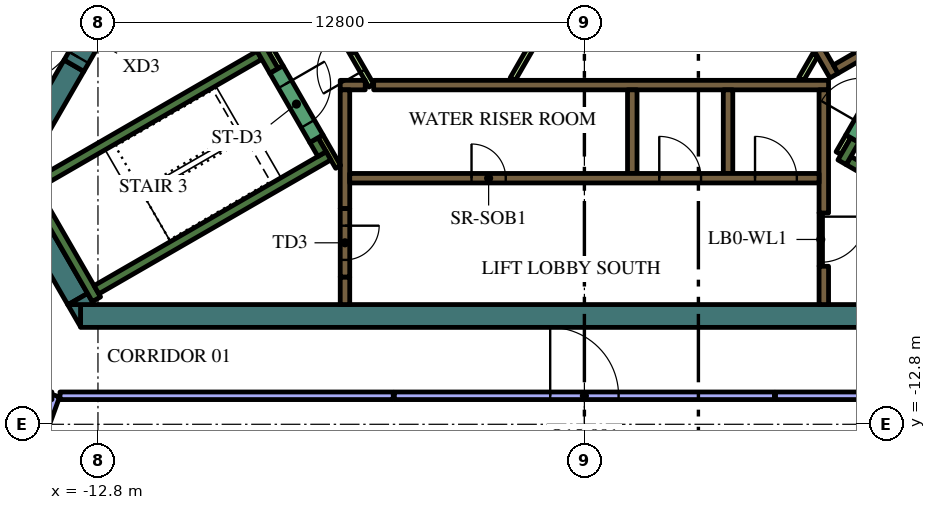
"""IFC4 building model, lengths in metres.
Left out: names, types, materials, properties, quantities, classifications, styles, units other than length and angle.
Written with IfcOpenShell. Run it as: python <this file> out.ifc"""

import sys

from ifc_helpers import new_model, si_unit, direction, frame, frame_2d, origin, place, context, subcontext, project, spatial, polyline, rectangle, outline, extrude, element, fill, save


model = new_model("IFC4")
c1 = context("Model", 3, precision=1e-05, world=origin(), true_north=direction((0.0, 1.0)))
c2 = subcontext(c1, "Body", "Model", "MODEL_VIEW")
j1 = project(units=[si_unit("LENGTHUNIT", "METRE"), si_unit("PLANEANGLEUNIT", "RADIAN")], contexts=[c1])
p1 = place(None, origin())
s1 = spatial("IfcSite", under=j1, at=p1, CompositionType="ELEMENT")
p2 = place(p1, origin())
s2 = spatial("IfcBuilding", under=s1, at=p2, CompositionType="ELEMENT")
p3 = place(p2, frame((0.0, 0.0, 317.4)))
s3 = spatial("IfcBuildingStorey", under=s2, at=p3, CompositionType="ELEMENT", Elevation=317.4)
p4 = place(p3, frame((8.904, -9.95, 0.0), z_axis=(0.0, 0.0, 1.0), x_axis=(-1.0, 0.0, 0.0)))
e1 = element("IfcWall", 1, at=p4, inside=s3, PredefinedType="SOLIDWALL", context=c2, shape_type="SweptSolid", body=[
    extrude(rectangle(XDim=22.161, YDim=0.6, at=frame_2d((11.081, 0.0))), origin(), (0.0, 0.0, 1.0), 4.2),
])
p5 = place(p3, origin())
e2 = element("IfcWall", 2, at=p5, inside=s3, PredefinedType="SOLIDWALL", context=c2, shape_type="SweptSolid", body=[
    extrude(outline(polyline([(-13.597, -9.65), (-13.259, -9.65), (-13.259, -10.236), (-13.597, -9.65)])), origin(), (0.0, 0.0, 1.0), 4.2),
])
p6 = place(p3, frame((-13.333, -9.506, 0.0), z_axis=(0.0, 0.0, 1.0), x_axis=(-0.500019073792, 0.866014391245, 0.0)))
e3 = element("IfcWall", 3, at=p6, inside=s3, PredefinedType="SOLIDWALL", context=c2, shape_type="SweptSolid", body=[
    extrude(rectangle(XDim=3.823, YDim=0.6, at=frame_2d((1.912, 0.0))), origin(), (0.0, 0.0, 1.0), 4.2),
])
e4 = element("IfcWall", 4, at=p5, inside=s3, PredefinedType="SOLIDWALL", context=c2, shape_type="SweptSolid", body=[
    extrude(outline(polyline([(-12.904, -9.65), (-13.58, -9.65), (-13.073, -9.357), (-12.904, -9.65)])), origin(), (0.0, 0.0, 1.0), 4.2),
])
p7 = place(p3, frame((-13.432, -3.364, 0.0), z_axis=(0.0, 0.0, 1.0), x_axis=(-0.499960127962, -0.866048422692, 0.0)))
e5 = element("IfcWall", 5, at=p7, inside=s3, PredefinedType="SOLIDWALL", context=c2, shape_type="SweptSolid", body=[
    extrude(rectangle(XDim=2.934, YDim=0.6, at=frame_2d((1.467, 0.0))), origin(), (0.0, 0.0, 1.0), 4.2),
])
p8 = place(p3, frame((12.84, -9.261, 0.0), z_axis=(0.0, 0.0, 1.0), x_axis=(-0.866013990052, 0.500019768644, 0.0)))
e6 = element("IfcWall", 6, at=p8, inside=s3, PredefinedType="SOLIDWALL", context=c2, shape_type="SweptSolid", body=[
    extrude(rectangle(XDim=6.8, YDim=0.25, at=frame_2d((3.4, 0.0))), origin(), (0.0, 0.0, 1.0), 4.2),
])
p9 = place(p3, frame((6.78, -5.906, 0.0), z_axis=(0.0, 0.0, 1.0), x_axis=(0.500223362819, 0.865896406789, 0.0)))
e7 = element("IfcWall", 7, at=p9, inside=s3, PredefinedType="SOLIDWALL", context=c2, shape_type="SweptSolid", body=[
    extrude(rectangle(XDim=0.675, YDim=0.25, at=frame_2d((0.337, 0.0))), origin(), (0.0, 0.0, 1.0), 4.2),
])
p10 = place(p3, frame((-12.84, -9.511, 0.0), z_axis=(0.0, 0.0, 1.0), x_axis=(-0.499997733992, 0.866026712061, 0.0)))
e8 = element("IfcWall", 8, at=p10, inside=s3, PredefinedType="SOLIDWALL", context=c2, shape_type="SweptSolid", body=[
    extrude(rectangle(XDim=3.634, YDim=0.25, at=frame_2d((1.817, 0.0))), origin(), (0.0, 0.0, 1.0), 4.2),
])
p11 = place(p3, frame((-14.44, -6.49, 0.0), z_axis=(0.0, 0.0, 1.0), x_axis=(0.866022966069, 0.500004222222, 0.0)))
e9 = element("IfcWall", 9, at=p11, inside=s3, PredefinedType="SOLIDWALL", context=c2, shape_type="SweptSolid", body=[
    extrude(rectangle(XDim=6.8, YDim=0.25, at=frame_2d((3.4, 0.0))), origin(), (0.0, 0.0, 1.0), 4.2),
])
p12 = place(p3, frame((-8.168, -3.503, 0.0), z_axis=(0.0, 0.0, 1.0), x_axis=(-0.499952099219, 0.866053057547, 0.0)))
e10 = element("IfcWall", 10, at=p12, inside=s3, PredefinedType="SOLIDWALL", context=c2, shape_type="SweptSolid", body=[
    extrude(rectangle(XDim=0.675, YDim=0.25, at=frame_2d((0.337, 0.0))), origin(), (0.0, 0.0, 1.0), 4.2),
])
p13 = place(p3, frame((-12.84, -9.261, 0.0), z_axis=(0.0, 0.0, 1.0), x_axis=(0.866016039709, 0.500016218704, 0.0)))
e11 = element("IfcWall", 11, at=p13, inside=s3, PredefinedType="SOLIDWALL", context=c2, shape_type="SweptSolid", body=[
    extrude(rectangle(XDim=7.05, YDim=0.25, at=frame_2d((3.525, 0.0))), origin(), (0.0, 0.0, 1.0), 4.2),
])
p14 = place(p3, frame((-6.905, -5.69, 0.0), z_axis=(0.0, 0.0, 1.0), x_axis=(-0.500402024738, 0.865793170242, 0.0)))
e12 = element("IfcWall", 12, at=p14, inside=s3, PredefinedType="SOLIDWALL", context=c2, shape_type="SweptSolid", body=[
    extrude(rectangle(XDim=0.425, YDim=0.25, at=frame_2d((0.212, 0.0))), origin(), (0.0, 0.0, 1.0), 4.2),
])
p15 = place(p3, frame((-5.545, -3.875, 0.0), z_axis=(0.0, 0.0, 1.0), x_axis=(1.0, 0.0, 0.0)))
e13 = element("IfcWall", 13, at=p15, inside=s3, PredefinedType="SOLIDWALL", context=c2, shape_type="SweptSolid", body=[
    extrude(rectangle(XDim=11.97, YDim=0.25, at=frame_2d((5.985, 0.0))), origin(), (0.0, 0.0, 1.0), 4.2),
])
p16 = place(p3, frame((-6.425, -3.875, 0.0), z_axis=(0.0, 0.0, 1.0), x_axis=(1.0, 0.0, 0.0)))
e14 = element("IfcWall", 14, at=p16, inside=s3, PredefinedType="SOLIDWALL", context=c2, shape_type="SweptSolid", body=[
    extrude(rectangle(XDim=0.658, YDim=0.25, at=frame_2d((0.329, 0.0))), origin(), (0.0, 0.0, 1.0), 4.2),
])
p17 = place(p3, frame((6.3, -7.24, 0.0), z_axis=(0.0, 0.0, 1.0), x_axis=(0.0, 1.0, 0.0)))
e15 = element("IfcWall", 15, at=p17, inside=s3, PredefinedType="SOLIDWALL", context=c2, shape_type="SweptSolid", body=[
    extrude(rectangle(XDim=3.24, YDim=0.25, at=frame_2d((1.62, 0.0))), origin(), (0.0, 0.0, 1.0), 4.2),
])
p18 = place(p3, frame((6.3, -9.65, 0.0), z_axis=(0.0, 0.0, 1.0), x_axis=(0.0, 1.0, 0.0)))
e16 = element("IfcWall", 16, at=p18, inside=s3, PredefinedType="SOLIDWALL", context=c2, shape_type="SweptSolid", body=[
    extrude(rectangle(XDim=1.008, YDim=0.25, at=frame_2d((0.504, 0.0))), origin(), (0.0, 0.0, 1.0), 4.2),
])
for number, where, z_axis, x_axis in (
    (17, (3.78, -4.0, 0.0), (0.0, 0.0, 1.0), (0.0, -1.0, 0.0)),
    (18, (1.26, -4.0, 0.0), (0.0, 0.0, 1.0), (0.0, -1.0, 0.0)),
):
    element("IfcWall", number, at=place(p3, frame(where, z_axis=z_axis, x_axis=x_axis)), inside=s3, PredefinedType="SOLIDWALL", context=c2, shape_type="SweptSolid", body=[
        extrude(rectangle(XDim=2.2, YDim=0.25, at=frame_2d((1.1, 0.0))), origin(), (0.0, 0.0, 1.0), 4.2),
    ])
p19 = place(p3, frame((-6.3, -7.125, 0.0), z_axis=(0.0, 0.0, 1.0), x_axis=(0.0, 1.0, 0.0)))
e19 = element("IfcWall", 19, at=p19, inside=s3, PredefinedType="SOLIDWALL", context=c2, shape_type="SweptSolid", body=[
    extrude(rectangle(XDim=3.125, YDim=0.25, at=frame_2d((1.562, 0.0))), origin(), (0.0, 0.0, 1.0), 4.2),
])
p20 = place(p3, frame((-6.3, -8.925, 0.0), z_axis=(0.0, 0.0, 1.0), x_axis=(0.0, -1.0, 0.0)))
e20 = element("IfcWall", 20, at=p20, inside=s3, PredefinedType="SOLIDWALL", context=c2, shape_type="SweptSolid", body=[
    extrude(rectangle(XDim=0.725, YDim=0.25, at=frame_2d((0.363, 0.0))), origin(), (0.0, 0.0, 1.0), 4.2),
])
p21 = place(p3, frame((6.568, -3.627, 0.0), z_axis=(0.0, 0.0, 1.0), x_axis=(-0.499999455981, 0.866025717874, 0.0)))
e21 = element("IfcWall", 21, at=p21, inside=s3, PredefinedType="SOLIDWALL", context=c2, shape_type="SweptSolid", body=[
    extrude(rectangle(XDim=11.978, YDim=0.25, at=frame_2d((5.989, 0.0))), origin(), (0.0, 0.0, 1.0), 4.2),
])
p22 = place(p3, frame((6.614, -3.456, 0.0), z_axis=(0.0, 0.0, 1.0), x_axis=(0.866032512851, 0.499987686533, 0.0)))
e22 = element("IfcWall", 22, at=p22, inside=s3, PredefinedType="SOLIDWALL", context=c2, shape_type="SweptSolid", body=[
    extrude(rectangle(XDim=2.975, YDim=0.25, at=frame_2d((1.487, 0.0))), origin(), (0.0, 0.0, 1.0), 4.2),
])
p23 = place(p3, frame((-8.252, -2.958, 0.0), z_axis=(0.0, 0.0, 1.0), x_axis=(0.500174715838, -0.865924508047, 0.0)))
e23 = element("IfcWall", 23, at=p23, inside=s3, PredefinedType="PARTITIONING", context=c2, shape_type="SweptSolid", body=[
    extrude(rectangle(XDim=0.514, YDim=0.15, at=frame_2d((0.257, 0.0))), origin(), (0.0, 0.0, 1.0), 3.5),
])
p24 = place(p3, frame((-6.48, -6.027, 0.0), z_axis=(0.0, 0.0, 1.0), x_axis=(-0.499927229454, 0.866067413802, 0.0)))
e24 = element("IfcWall", 24, at=p24, inside=s3, PredefinedType="PARTITIONING", context=c2, shape_type="SweptSolid", body=[
    extrude(rectangle(XDim=0.929, YDim=0.15, at=frame_2d((0.464, 0.0))), origin(), (0.0, 0.0, 1.0), 4.2),
])
p25 = place(p3, frame((6.945, -5.222, 0.0), z_axis=(0.0, 0.0, 1.0), x_axis=(-0.499818422106, -0.866130212453, 0.0)))
e25 = element("IfcWall", 25, at=p25, inside=s3, PredefinedType="PARTITIONING", context=c2, shape_type="SweptSolid", body=[
    extrude(rectangle(XDim=0.514, YDim=0.15, at=frame_2d((0.257, 0.0))), origin(), (0.0, 0.0, 1.0), 3.5),
])
p26 = place(p3, frame((5.705, -3.718, 0.0), z_axis=(0.0, 0.0, 1.0), x_axis=(0.499962090823, 0.866047289552, 0.0)))
e26 = element("IfcWall", 26, at=p26, inside=s3, PredefinedType="PARTITIONING", context=c2, shape_type="SweptSolid", body=[
    extrude(rectangle(XDim=0.735, YDim=0.15, at=frame_2d((0.367, 0.0))), origin(), (0.0, 0.0, 1.0), 3.5),
])
p27 = place(p3, frame((-1.887, -3.718, 0.0), z_axis=(0.0, 0.0, 1.0), x_axis=(0.500043732237, 0.866000153493, 0.0)))
e27 = element("IfcWall", 27, at=p27, inside=s3, PredefinedType="PARTITIONING", context=c2, shape_type="SweptSolid", body=[
    extrude(rectangle(XDim=3.114, YDim=0.15, at=frame_2d((1.557, 0.0))), origin(), (0.0, 0.0, 1.0), 3.5),
])
p28 = place(p3, frame((-6.175, -6.325, 0.0), z_axis=(0.0, 0.0, 1.0), x_axis=(1.0, 0.0, 0.0)))
e28 = element("IfcWall", 28, at=p28, inside=s3, PredefinedType="SOLIDWALL", context=c2, shape_type="SweptSolid", body=[
    extrude(rectangle(XDim=12.35, YDim=0.25, at=frame_2d((6.175, 0.0))), origin(), (0.0, 0.0, 1.0), 4.2),
])
p29 = place(p28, frame((3.205, 0.0, 0.0)))
e29 = element("IfcOpeningElement", 29, at=p29, cuts=e28, PredefinedType="OPENING", context=c2, shape_type="SweptSolid", body=[
    extrude(rectangle(XDim=0.9, YDim=2.1, at=frame_2d((0.45, 1.05))), frame((0.0, 0.135, 0.0), z_axis=(0.0, -1.0, 0.0), x_axis=(1.0, 0.0, 0.0)), (0.0, 0.0, 1.0), 0.27),
])
p30 = place(p28, frame((8.145, 0.0, 0.0)))
e30 = element("IfcOpeningElement", 30, at=p30, cuts=e28, PredefinedType="OPENING", context=c2, shape_type="SweptSolid", body=[
    extrude(rectangle(XDim=1.1, YDim=2.1, at=frame_2d((0.55, 1.05))), frame((0.0, 0.135, 0.0), z_axis=(0.0, -1.0, 0.0), x_axis=(1.0, 0.0, 0.0)), (0.0, 0.0, 1.0), 0.27),
])
p31 = place(p28, frame((10.665, 0.0, 0.0)))
e31 = element("IfcOpeningElement", 31, at=p31, cuts=e28, PredefinedType="OPENING", context=c2, shape_type="SweptSolid", body=[
    extrude(rectangle(XDim=1.1, YDim=2.1, at=frame_2d((0.55, 1.05))), frame((0.0, 0.135, 0.0), z_axis=(0.0, -1.0, 0.0), x_axis=(1.0, 0.0, 0.0)), (0.0, 0.0, 1.0), 0.27),
])
p32 = place(p3, frame((7.053, -5.284, 0.0), z_axis=(0.0, 0.0, 1.0), x_axis=(0.500078061341, 0.865980330357, 0.0)))
e32 = element("IfcWall", 32, at=p32, inside=s3, PredefinedType="SOLIDWALL", context=c2, shape_type="SweptSolid", body=[
    extrude(rectangle(XDim=2.1, YDim=0.4, at=frame_2d((1.05, 0.0))), origin(), (0.0, 0.0, 1.0), 4.2),
])
p33 = place(p32, frame((0.45, 0.0, 0.0)))
e33 = element("IfcOpeningElement", 33, at=p33, cuts=e32, PredefinedType="OPENING", context=c2, shape_type="SweptSolid", body=[
    extrude(rectangle(XDim=1.2, YDim=2.1, at=frame_2d((0.6, 1.05))), frame((0.0, 0.21, 0.0), z_axis=(0.0, -1.0, 0.0), x_axis=(1.0, 0.0, 0.0)), (0.0, 0.0, 1.0), 0.42),
])
p34 = place(p3, frame((-8.103, -3.466, 0.0), z_axis=(0.0, 0.0, 1.0), x_axis=(0.500078061341, -0.865980330357, 0.0)))
e34 = element("IfcWall", 34, at=p34, inside=s3, PredefinedType="SOLIDWALL", context=c2, shape_type="SweptSolid", body=[
    extrude(rectangle(XDim=2.1, YDim=0.4, at=frame_2d((1.05, 0.0))), origin(), (0.0, 0.0, 1.0), 4.2),
])
p35 = place(p34, frame((0.45, 0.0, 0.0)))
e35 = element("IfcOpeningElement", 35, at=p35, cuts=e34, PredefinedType="OPENING", context=c2, shape_type="SweptSolid", body=[
    extrude(rectangle(XDim=1.2, YDim=2.1, at=frame_2d((0.6, 1.05))), frame((0.0, 0.21, 0.0), z_axis=(0.0, -1.0, 0.0), x_axis=(1.0, 0.0, 0.0)), (0.0, 0.0, 1.0), 0.42),
])
p36 = place(p3, frame((-6.3, -7.125, 0.0), z_axis=(0.0, 0.0, 1.0), x_axis=(0.0, -1.0, 0.0)))
e36 = element("IfcWall", 36, at=p36, inside=s3, PredefinedType="SOLIDWALL", context=c2, shape_type="SweptSolid", body=[
    extrude(rectangle(XDim=1.8, YDim=0.25, at=frame_2d((0.9, 0.0))), origin(), (0.0, 0.0, 1.0), 4.2),
])
p37 = place(p36, frame((0.45, 0.0, 0.0)))
e37 = element("IfcOpeningElement", 37, at=p37, cuts=e36, PredefinedType="OPENING", context=c2, shape_type="SweptSolid", body=[
    extrude(rectangle(XDim=0.9, YDim=2.1, at=frame_2d((0.45, 1.05))), frame((0.0, 0.135, 0.0), z_axis=(0.0, -1.0, 0.0), x_axis=(1.0, 0.0, 0.0)), (0.0, 0.0, 1.0), 0.27),
])
p38 = place(p3, frame((-5.606, -3.89, 0.0), z_axis=(0.0, 0.0, 1.0), x_axis=(-0.500027713859, 0.866009402589, 0.0)))
e38 = element("IfcWall", 38, at=p38, inside=s3, PredefinedType="PARTITIONING", context=c2, shape_type="SweptSolid", body=[
    extrude(rectangle(XDim=2.1, YDim=0.15, at=frame_2d((1.05, 0.0))), origin(), (0.0, 0.0, 1.0), 3.5),
])
p39 = place(p38, frame((0.45, 0.0, 0.0)))
e39 = element("IfcOpeningElement", 39, at=p39, cuts=e38, PredefinedType="OPENING", context=c2, shape_type="SweptSolid", body=[
    extrude(rectangle(XDim=1.2, YDim=2.1, at=frame_2d((0.6, 1.05))), frame((0.0, 0.085, 0.0), z_axis=(0.0, -1.0, 0.0), x_axis=(1.0, 0.0, 0.0)), (0.0, 0.0, 1.0), 0.17),
])
p40 = place(p3, frame((6.22, -7.237, 0.0), z_axis=(0.0, 0.0, 1.0), x_axis=(0.0, -1.0, 0.0)))
e40 = element("IfcWall", 40, at=p40, inside=s3, PredefinedType="PARTITIONING", context=c2, shape_type="SweptSolid", body=[
    extrude(rectangle(XDim=1.4, YDim=0.09, at=frame_2d((0.7, 0.0))), origin(), (0.0, 0.0, 1.0), 3.5),
])
p41 = place(p40, frame((0.1, 0.0, 0.0)))
e41 = element("IfcOpeningElement", 41, at=p41, cuts=e40, PredefinedType="OPENING", context=c2, shape_type="SweptSolid", body=[
    extrude(rectangle(XDim=1.2, YDim=2.1, at=frame_2d((0.6, 1.05))), frame((0.0, 0.055, 0.0), z_axis=(0.0, -1.0, 0.0), x_axis=(1.0, 0.0, 0.0)), (0.0, 0.0, 1.0), 0.11),
])
p42 = place(p3, frame((-13.432, -3.364, 0.0), z_axis=(0.0, 0.0, 1.0), x_axis=(0.500062241894, 0.865989465428, 0.0)))
e42 = element("IfcWall", 42, at=p42, inside=s3, PredefinedType="SOLIDWALL", context=c2, shape_type="SweptSolid", body=[
    extrude(rectangle(XDim=1.7, YDim=0.6, at=frame_2d((0.85, 0.0))), origin(), (0.0, 0.0, 1.0), 4.2),
])
p43 = place(p42, frame((0.25, 0.0, 0.0)))
e43 = element("IfcOpeningElement", 43, at=p43, cuts=e42, PredefinedType="OPENING", context=c2, shape_type="SweptSolid", body=[
    extrude(rectangle(XDim=1.2, YDim=2.1, at=frame_2d((0.6, 1.05))), frame((0.0, 0.31, 0.0), z_axis=(0.0, -1.0, 0.0), x_axis=(1.0, 0.0, 0.0)), (0.0, 0.0, 1.0), 0.62),
])
p44 = place(p3, frame((-15.774, -17.19, 0.0), z_axis=(0.0, 0.0, 1.0), x_axis=(0.341821907823, 0.93976474893, 0.0)))
e44 = element("IfcWall", 44, at=p44, inside=s3, PredefinedType="PARTITIONING", context=c2, shape_type="SweptSolid", body=[
    extrude(rectangle(XDim=5.469, YDim=0.2, at=frame_2d((2.735, 0.0))), origin(), (0.0, 0.0, 1.0), 3.5),
])
p45 = place(p3, frame((-5.0, -12.05, 0.0), z_axis=(0.0, 0.0, 1.0), x_axis=(1.0, 0.0, 0.0)))
e45 = element("IfcWall", 45, at=p45, inside=s3, PredefinedType="PARTITIONING", context=c2, shape_type="SweptSolid", body=[
    extrude(rectangle(XDim=10.0, YDim=0.2, at=frame_2d((5.0, 0.0))), origin(), (0.0, 0.0, 1.0), 3.5),
])
p46 = place(p45, frame((4.1, 0.0, 0.0)))
e46 = element("IfcOpeningElement", 46, at=p46, cuts=e45, PredefinedType="OPENING", context=c2, shape_type="SweptSolid", body=[
    extrude(rectangle(XDim=1.8, YDim=2.1, at=frame_2d((0.9, 1.05))), frame((0.0, 0.11, 0.0), z_axis=(0.0, -1.0, 0.0), x_axis=(1.0, 0.0, 0.0)), (0.0, 0.0, 1.0), 0.22),
])
p47 = place(p3, frame((-13.799, -12.05, 0.0), z_axis=(0.0, 0.0, 1.0), x_axis=(1.0, 0.0, 0.0)))
e47 = element("IfcWall", 47, at=p47, inside=s3, PredefinedType="PARTITIONING", context=c2, shape_type="SweptSolid", body=[
    extrude(rectangle(XDim=8.769, YDim=0.2, at=frame_2d((4.384, 0.0))), origin(), (0.0, 0.0, 1.0), 3.5),
])
p48 = place(p3, frame((5.03, -12.05, 0.0), z_axis=(0.0, 0.0, 1.0), x_axis=(1.0, 0.0, 0.0)))
e48 = element("IfcWall", 48, at=p48, inside=s3, PredefinedType="PARTITIONING", context=c2, shape_type="SweptSolid", body=[
    extrude(rectangle(XDim=9.259, YDim=0.2, at=frame_2d((4.63, 0.0))), origin(), (0.0, 0.0, 1.0), 3.5),
])
p49 = place(p3, frame((-13.683, 0.4, 0.0), z_axis=(0.0, 0.0, 1.0), x_axis=(-0.500004109969, -0.86602303088, 0.0)))
e49 = element("IfcWall", 49, at=p49, inside=s3, PredefinedType="PARTITIONING", context=c2, shape_type="SweptSolid", body=[
    extrude(rectangle(XDim=7.303, YDim=0.2, at=frame_2d((3.652, 0.0))), origin(), (0.0, 0.0, 1.0), 3.5),
])
p50 = place(p49, frame((2.8, 0.0, 0.0)))
e50 = element("IfcOpeningElement", 50, at=p50, cuts=e49, PredefinedType="OPENING", context=c2, shape_type="SweptSolid", body=[
    extrude(rectangle(XDim=1.8, YDim=2.1, at=frame_2d((0.9, 1.05))), frame((0.0, 0.11, 0.0), z_axis=(0.0, -1.0, 0.0), x_axis=(1.0, 0.0, 0.0)), (0.0, 0.0, 1.0), 0.22),
])
p51 = place(p29, origin())
e51 = element("IfcDoor", 51, at=p51, inside=s3, OperationType="SINGLE_SWING_LEFT", PredefinedType="DOOR", context=c2, shape_type="SweptSolid", body=[
    extrude(rectangle(XDim=0.9, YDim=2.1, at=frame_2d((0.45, 1.05))), frame((0.0, 0.025, 0.0), z_axis=(0.0, -1.0, 0.0), x_axis=(1.0, 0.0, 0.0)), (0.0, 0.0, 1.0), 0.05),
])
fill(e29, e51)
p52 = place(p30, origin())
e52 = element("IfcDoor", 52, at=p52, inside=s3, OperationType="DOUBLE_DOOR_SLIDING", PredefinedType="DOOR", context=c2, shape_type="SweptSolid", body=[
    extrude(rectangle(XDim=1.1, YDim=2.1, at=frame_2d((0.55, 1.05))), frame((0.0, 0.025, 0.0), z_axis=(0.0, -1.0, 0.0), x_axis=(1.0, 0.0, 0.0)), (0.0, 0.0, 1.0), 0.05),
])
fill(e30, e52)
p53 = place(p31, origin())
e53 = element("IfcDoor", 53, at=p53, inside=s3, OperationType="DOUBLE_DOOR_SLIDING", PredefinedType="DOOR", context=c2, shape_type="SweptSolid", body=[
    extrude(rectangle(XDim=1.1, YDim=2.1, at=frame_2d((0.55, 1.05))), frame((0.0, 0.025, 0.0), z_axis=(0.0, -1.0, 0.0), x_axis=(1.0, 0.0, 0.0)), (0.0, 0.0, 1.0), 0.05),
])
fill(e31, e53)
p54 = place(p35, origin())
e54 = element("IfcDoor", 54, at=p54, inside=s3, OperationType="SINGLE_SWING_LEFT", PredefinedType="DOOR", context=c2, shape_type="SweptSolid", body=[
    extrude(rectangle(XDim=1.2, YDim=2.1, at=frame_2d((0.6, 1.05))), frame((0.0, 0.025, 0.0), z_axis=(0.0, -1.0, 0.0), x_axis=(1.0, 0.0, 0.0)), (0.0, 0.0, 1.0), 0.05),
])
fill(e35, e54)
p55 = place(p37, origin())
e55 = element("IfcDoor", 55, at=p55, inside=s3, OperationType="SINGLE_SWING_LEFT", PredefinedType="DOOR", context=c2, shape_type="SweptSolid", body=[
    extrude(rectangle(XDim=0.9, YDim=2.1, at=frame_2d((0.45, 1.05))), frame((0.0, 0.025, 0.0), z_axis=(0.0, -1.0, 0.0), x_axis=(1.0, 0.0, 0.0)), (0.0, 0.0, 1.0), 0.05),
])
fill(e37, e55)
p56 = place(p39, origin())
e56 = element("IfcDoor", 56, at=p56, inside=s3, OperationType="SINGLE_SWING_LEFT", PredefinedType="DOOR", context=c2, shape_type="SweptSolid", body=[
    extrude(rectangle(XDim=1.2, YDim=2.1, at=frame_2d((0.6, 1.05))), frame((0.0, 0.025, 0.0), z_axis=(0.0, -1.0, 0.0), x_axis=(1.0, 0.0, 0.0)), (0.0, 0.0, 1.0), 0.05),
])
fill(e39, e56)
p57 = place(p41, origin())
e57 = element("IfcDoor", 57, at=p57, inside=s3, OperationType="SINGLE_SWING_LEFT", PredefinedType="DOOR", context=c2, shape_type="SweptSolid", body=[
    extrude(rectangle(XDim=1.2, YDim=2.1, at=frame_2d((0.6, 1.05))), frame((0.0, 0.025, 0.0), z_axis=(0.0, -1.0, 0.0), x_axis=(1.0, 0.0, 0.0)), (0.0, 0.0, 1.0), 0.05),
])
fill(e41, e57)
p58 = place(p43, origin())
e58 = element("IfcDoor", 58, at=p58, inside=s3, OperationType="SINGLE_SWING_LEFT", PredefinedType="DOOR", context=c2, shape_type="SweptSolid", body=[
    extrude(rectangle(XDim=1.2, YDim=2.1, at=frame_2d((0.6, 1.05))), frame((0.0, 0.025, 0.0), z_axis=(0.0, -1.0, 0.0), x_axis=(1.0, 0.0, 0.0)), (0.0, 0.0, 1.0), 0.05),
])
fill(e43, e58)
p59 = place(p46, origin())
e59 = element("IfcDoor", 59, at=p59, inside=s3, OperationType="DOUBLE_DOOR_SINGLE_SWING", PredefinedType="DOOR", context=c2, shape_type="SweptSolid", body=[
    extrude(rectangle(XDim=1.8, YDim=2.1, at=frame_2d((0.9, 1.05))), frame((0.0, 0.025, 0.0), z_axis=(0.0, -1.0, 0.0), x_axis=(1.0, 0.0, 0.0)), (0.0, 0.0, 1.0), 0.05),
])
fill(e46, e59)
save(model, sys.argv[1])
